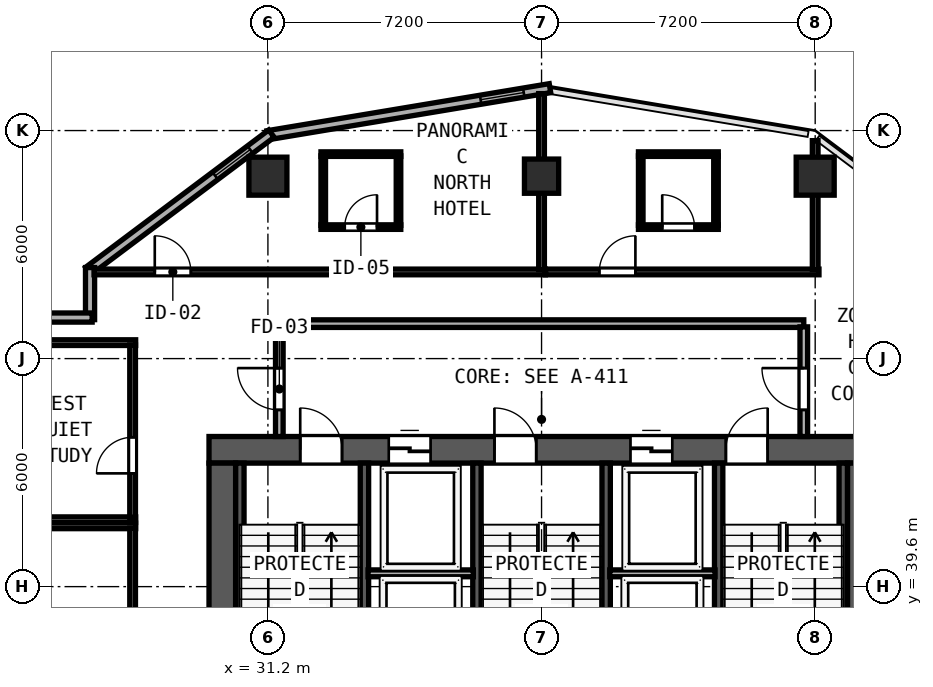
"""IFC4 building model, lengths in metres.
Left out: names, types, materials, properties, quantities, classifications, styles, units other than length and angle.
Written with IfcOpenShell. Run it as: python <this file> out.ifc"""

import sys

from ifc_helpers import new_model, si_unit, direction, frame, frame_2d, origin, origin_2d, place, context, subcontext, project, spatial, rectangle, hollow_rectangle, extrude, element, fill, save


model = new_model("IFC4")
c1 = context("Model", 3, precision=1e-05, world=origin(), true_north=direction((0.0, 1.0)))
c2 = subcontext(c1, "Body", "Model", "MODEL_VIEW")
j1 = project(units=[si_unit("LENGTHUNIT", "METRE"), si_unit("PLANEANGLEUNIT", "RADIAN")], contexts=[c1])
p1 = place(None, origin())
s1 = spatial("IfcSite", under=j1, at=p1, CompositionType="ELEMENT")
p2 = place(p1, origin())
s2 = spatial("IfcBuilding", under=s1, at=p2, CompositionType="ELEMENT")
p3 = place(p2, frame((0.0, 0.0, 144.8)))
s3 = spatial("IfcBuildingStorey", under=s2, at=p3, CompositionType="ELEMENT", Elevation=144.8)
p4 = place(p3, frame((29.65, 43.2, 0.0), z_axis=(0.0, 0.0, 1.0), x_axis=(1.0, 0.0, 0.0)))
e1 = element("IfcWall", 1, at=p4, inside=s3, PredefinedType="SHEAR", context=c2, shape_type="SweptSolid", body=[
    extrude(rectangle(XDim=17.5, YDim=0.7, at=frame_2d((8.75, 0.0))), origin(), (0.0, 0.0, 1.0), 3.6),
])
p5 = place(p4, frame((2.4, 0.0, 0.0)))
e2 = element("IfcOpeningElement", 2, at=p5, cuts=e1, PredefinedType="OPENING", context=c2, shape_type="SweptSolid", body=[
    extrude(rectangle(XDim=1.1, YDim=2.15, at=frame_2d((0.55, 1.075))), frame((0.0, 0.36, 0.0), z_axis=(0.0, -1.0, 0.0), x_axis=(1.0, 0.0, 0.0)), (0.0, 0.0, 1.0), 0.72),
])
p6 = place(p4, frame((7.51, 0.0, 0.0)))
e3 = element("IfcOpeningElement", 3, at=p6, cuts=e1, PredefinedType="OPENING", context=c2, shape_type="SweptSolid", body=[
    extrude(rectangle(XDim=1.1, YDim=2.15, at=frame_2d((0.55, 1.075))), frame((0.0, 0.36, 0.0), z_axis=(0.0, -1.0, 0.0), x_axis=(1.0, 0.0, 0.0)), (0.0, 0.0, 1.0), 0.72),
])
p7 = place(p4, frame((13.6, 0.0, 0.0)))
e4 = element("IfcOpeningElement", 4, at=p7, cuts=e1, PredefinedType="OPENING", context=c2, shape_type="SweptSolid", body=[
    extrude(rectangle(XDim=1.1, YDim=2.15, at=frame_2d((0.55, 1.075))), frame((0.0, 0.36, 0.0), z_axis=(0.0, -1.0, 0.0), x_axis=(1.0, 0.0, 0.0)), (0.0, 0.0, 1.0), 0.72),
])
p8 = place(p4, frame((4.73, 0.0, 0.0)))
e5 = element("IfcOpeningElement", 5, at=p8, cuts=e1, PredefinedType="OPENING", context=c2, shape_type="SweptSolid", body=[
    extrude(rectangle(XDim=1.1, YDim=2.2, at=frame_2d((0.55, 1.1))), frame((0.0, 0.36, 0.0), z_axis=(0.0, -1.0, 0.0), x_axis=(1.0, 0.0, 0.0)), (0.0, 0.0, 1.0), 0.72),
])
p9 = place(p4, frame((11.09, 0.0, 0.0)))
e6 = element("IfcOpeningElement", 6, at=p9, cuts=e1, PredefinedType="OPENING", context=c2, shape_type="SweptSolid", body=[
    extrude(rectangle(XDim=1.1, YDim=2.2, at=frame_2d((0.55, 1.1))), frame((0.0, 0.36, 0.0), z_axis=(0.0, -1.0, 0.0), x_axis=(1.0, 0.0, 0.0)), (0.0, 0.0, 1.0), 0.72),
])
for number, where, z_axis, x_axis in (
    (7, (30.0, 32.8, 0.0), (0.0, 0.0, 1.0), (0.0, 1.0, 0.0)),
    (8, (46.8, 32.8, 0.0), (0.0, 0.0, 1.0), (0.0, 1.0, 0.0)),
):
    element("IfcWall", number, at=place(p3, frame(where, z_axis=z_axis, x_axis=x_axis)), inside=s3, PredefinedType="SHEAR", context=c2, shape_type="SweptSolid", body=[
        extrude(rectangle(XDim=10.05, YDim=0.7, at=frame_2d((5.025, 0.0))), origin(), (0.0, 0.0, 1.0), 3.6),
    ])
for number, where, z_axis, x_axis in (
    (9, (30.462, 35.39, 0.0), (0.0, 0.0, 1.0), (0.0, 1.0, 0.0)),
    (10, (33.74, 35.39, 0.0), (0.0, 0.0, 1.0), (0.0, 1.0, 0.0)),
    (11, (36.7, 35.39, 0.0), (0.0, 0.0, 1.0), (0.0, 1.0, 0.0)),
    (12, (40.1, 35.39, 0.0), (0.0, 0.0, 1.0), (0.0, 1.0, 0.0)),
    (13, (43.06, 35.39, 0.0), (0.0, 0.0, 1.0), (0.0, 1.0, 0.0)),
    (14, (46.338, 35.39, 0.0), (0.0, 0.0, 1.0), (0.0, 1.0, 0.0)),
):
    element("IfcWall", number, at=place(p3, frame(where, z_axis=z_axis, x_axis=x_axis)), inside=s3, PredefinedType="SHEAR", context=c2, shape_type="SweptSolid", body=[
        extrude(rectangle(XDim=7.46, YDim=0.22, at=frame_2d((3.73, 0.0))), origin(), (0.0, 0.0, 1.0), 3.6),
    ])
for number, where, z_axis, x_axis in (
    (15, (31.2, 50.4, 0.0), (0.0, 0.0, 1.0), (1.0, 0.0, 0.0)),
    (16, (45.6, 50.4, 0.0), (0.0, 0.0, 1.0), (1.0, 0.0, 0.0)),
):
    element("IfcColumn", number, at=place(p3, frame(where, z_axis=z_axis, x_axis=x_axis)), inside=s3, PredefinedType="COLUMN", context=c2, shape_type="SweptSolid", body=[
        extrude(hollow_rectangle(XDim=1.0, YDim=1.0, WallThickness=0.038, at=origin_2d()), origin(), (0.0, 0.0, 1.0), 3.8),
    ])
p10 = place(p3, frame((38.4, 50.4, 0.0), z_axis=(0.0, 0.0, 1.0), x_axis=(1.0, 0.0, 0.0)))
e17 = element("IfcColumn", 17, at=p10, inside=s3, PredefinedType="COLUMN", context=c2, shape_type="SweptSolid", body=[
    extrude(hollow_rectangle(XDim=0.9, YDim=0.9, WallThickness=0.034, at=origin_2d()), origin(), (0.0, 0.0, 1.0), 3.8),
])
p11 = place(p3, frame((38.622, 52.715, 0.0), z_axis=(0.0, 0.0, 1.0), x_axis=(-0.98639129485, -0.164414760418, 0.0)))
e18 = element("IfcWall", 18, at=p11, inside=s3, PredefinedType="SOLIDWALL", context=c2, shape_type="SweptSolid", body=[
    extrude(rectangle(XDim=7.53, YDim=0.24, at=frame_2d((3.765, 0.0))), origin(), (0.0, 0.0, 1.0), 3.6),
])
p12 = place(p11, frame((0.7, 0.0, 0.85)))
e19 = element("IfcOpeningElement", 19, at=p12, cuts=e18, PredefinedType="OPENING", context=c2, shape_type="SweptSolid", body=[
    extrude(rectangle(XDim=1.15, YDim=1.8, at=frame_2d((0.575, 0.9))), frame((0.0, 0.13, 0.0), z_axis=(0.0, -1.0, 0.0), x_axis=(1.0, 0.0, 0.0)), (0.0, 0.0, 1.0), 0.26),
])
p13 = place(p3, frame((31.292, 51.519, 0.0), z_axis=(0.0, 0.0, 1.0), x_axis=(-0.8, -0.6, 0.0)))
e20 = element("IfcWall", 20, at=p13, inside=s3, PredefinedType="SOLIDWALL", context=c2, shape_type="SweptSolid", body=[
    extrude(rectangle(XDim=6.021, YDim=0.24, at=frame_2d((3.01, 0.0))), origin(), (0.0, 0.0, 1.0), 3.6),
])
p14 = place(p13, frame((0.7, 0.0, 0.85)))
e21 = element("IfcOpeningElement", 21, at=p14, cuts=e20, PredefinedType="OPENING", context=c2, shape_type="SweptSolid", body=[
    extrude(rectangle(XDim=1.15, YDim=1.8, at=frame_2d((0.575, 0.9))), frame((0.0, 0.13, 0.0), z_axis=(0.0, -1.0, 0.0), x_axis=(1.0, 0.0, 0.0)), (0.0, 0.0, 1.0), 0.26),
])
p15 = place(p3, frame((26.52, 47.995, 0.0), z_axis=(0.0, 0.0, 1.0), x_axis=(0.0, -1.0, 0.0)))
e22 = element("IfcWall", 22, at=p15, inside=s3, PredefinedType="SOLIDWALL", context=c2, shape_type="SweptSolid", body=[
    extrude(rectangle(XDim=1.37, YDim=0.24, at=frame_2d((0.685, 0.0))), origin(), (0.0, 0.0, 1.0), 3.6),
])
p16 = place(p3, frame((26.575, 46.68, 0.0), z_axis=(0.0, 0.0, 1.0), x_axis=(-1.0, 0.0, 0.0)))
e23 = element("IfcWall", 23, at=p16, inside=s3, PredefinedType="SOLIDWALL", context=c2, shape_type="SweptSolid", body=[
    extrude(rectangle(XDim=1.31, YDim=0.24, at=frame_2d((0.655, 0.0))), origin(), (0.0, 0.0, 1.0), 3.6),
])
p17 = place(p3, frame((31.5, 46.52, 0.0), z_axis=(0.0, 0.0, 1.0), x_axis=(1.0, 0.0, 0.0)))
e24 = element("IfcWall", 24, at=p17, inside=s3, PredefinedType="SOLIDWALL", context=c2, shape_type="SweptSolid", body=[
    extrude(rectangle(XDim=13.8, YDim=0.2, at=frame_2d((6.9, 0.0))), origin(), (0.0, 0.0, 1.0), 3.6),
])
p18 = place(p3, frame((31.5, 43.55, 0.0), z_axis=(0.0, 0.0, 1.0), x_axis=(0.0, 1.0, 0.0)))
e25 = element("IfcWall", 25, at=p18, inside=s3, PredefinedType="SOLIDWALL", context=c2, shape_type="SweptSolid", body=[
    extrude(rectangle(XDim=2.885, YDim=0.2, at=frame_2d((1.442, 0.0))), origin(), (0.0, 0.0, 1.0), 3.6),
])
p19 = place(p18, frame((1.8, 0.0, 0.0), z_axis=(0.0, 0.0, 1.0), x_axis=(-1.0, 0.0, 0.0)))
e26 = element("IfcOpeningElement", 26, at=p19, cuts=e25, PredefinedType="OPENING", context=c2, shape_type="SweptSolid", body=[
    extrude(rectangle(XDim=1.1, YDim=2.15, at=frame_2d((0.55, 1.075))), frame((0.0, 0.11, 0.0), z_axis=(0.0, -1.0, 0.0), x_axis=(1.0, 0.0, 0.0)), (0.0, 0.0, 1.0), 0.22),
])
p20 = place(p3, frame((45.3, 43.55, 0.0), z_axis=(0.0, 0.0, 1.0), x_axis=(0.0, 1.0, 0.0)))
e27 = element("IfcWall", 27, at=p20, inside=s3, PredefinedType="SOLIDWALL", context=c2, shape_type="SweptSolid", body=[
    extrude(rectangle(XDim=2.885, YDim=0.2, at=frame_2d((1.442, 0.0))), origin(), (0.0, 0.0, 1.0), 3.6),
])
p21 = place(p20, frame((0.7, 0.0, 0.0)))
e28 = element("IfcOpeningElement", 28, at=p21, cuts=e27, PredefinedType="OPENING", context=c2, shape_type="SweptSolid", body=[
    extrude(rectangle(XDim=1.1, YDim=2.15, at=frame_2d((0.55, 1.075))), frame((0.0, 0.11, 0.0), z_axis=(0.0, -1.0, 0.0), x_axis=(1.0, 0.0, 0.0)), (0.0, 0.0, 1.0), 0.22),
])
for number, where, z_axis, x_axis in (
    (29, (33.835, 39.95, 0.0), (0.0, 0.0, 1.0), (1.0, 0.0, 0.0)),
    (30, (40.195, 39.95, 0.0), (0.0, 0.0, 1.0), (1.0, 0.0, 0.0)),
):
    element("IfcWall", number, at=place(p3, frame(where, z_axis=z_axis, x_axis=x_axis)), inside=s3, PredefinedType="SOLIDWALL", context=c2, shape_type="SweptSolid", body=[
        extrude(rectangle(XDim=2.77, YDim=0.18, at=frame_2d((1.385, 0.0))), origin(), (0.0, 0.0, 1.0), 3.6),
    ])
p22 = place(p3, frame((23.92, 41.2, 0.0), z_axis=(0.0, 0.0, 1.0), x_axis=(1.0, 0.0, 0.0)))
e31 = element("IfcWall", 31, at=p22, inside=s3, PredefinedType="PARTITIONING", context=c2, shape_type="SweptSolid", body=[
    extrude(rectangle(XDim=3.8, YDim=0.15, at=frame_2d((1.9, 0.0))), origin(), (0.0, 0.0, 1.0), 3.6),
])
p23 = place(p3, frame((27.64, 33.06, 0.0), z_axis=(0.0, 0.0, 1.0), x_axis=(0.0, 1.0, 0.0)))
e32 = element("IfcWall", 32, at=p23, inside=s3, PredefinedType="PARTITIONING", context=c2, shape_type="SweptSolid", body=[
    extrude(rectangle(XDim=8.08, YDim=0.15, at=frame_2d((4.04, 0.0))), origin(), (0.0, 0.0, 1.0), 3.6),
])
p24 = place(p23, frame((3.61, 0.0, 0.0), z_axis=(0.0, 0.0, 1.0), x_axis=(-1.0, 0.0, 0.0)))
e33 = element("IfcOpeningElement", 33, at=p24, cuts=e32, PredefinedType="OPENING", context=c2, shape_type="SweptSolid", body=[
    extrude(rectangle(XDim=0.95, YDim=2.12, at=frame_2d((0.475, 1.06))), frame((0.0, 0.085, 0.0), z_axis=(0.0, -1.0, 0.0), x_axis=(1.0, 0.0, 0.0)), (0.0, 0.0, 1.0), 0.17),
])
p25 = place(p3, frame((25.425, 46.02, 0.0), z_axis=(0.0, 0.0, 1.0), x_axis=(1.0, 0.0, 0.0)))
e34 = element("IfcWall", 34, at=p25, inside=s3, PredefinedType="PARTITIONING", context=c2, shape_type="SweptSolid", body=[
    extrude(rectangle(XDim=2.295, YDim=0.15, at=frame_2d((1.147, 0.0))), origin(), (0.0, 0.0, 1.0), 3.6),
])
p26 = place(p3, frame((23.92, 41.36, 0.0), z_axis=(0.0, 0.0, 1.0), x_axis=(1.0, 0.0, 0.0)))
e35 = element("IfcWall", 35, at=p26, inside=s3, PredefinedType="PARTITIONING", context=c2, shape_type="SweptSolid", body=[
    extrude(rectangle(XDim=3.8, YDim=0.15, at=frame_2d((1.9, 0.0))), origin(), (0.0, 0.0, 1.0), 3.6),
])
p27 = place(p3, frame((27.64, 41.42, 0.0), z_axis=(0.0, 0.0, 1.0), x_axis=(0.0, 1.0, 0.0)))
e36 = element("IfcWall", 36, at=p27, inside=s3, PredefinedType="PARTITIONING", context=c2, shape_type="SweptSolid", body=[
    extrude(rectangle(XDim=4.54, YDim=0.15, at=frame_2d((2.27, 0.0))), origin(), (0.0, 0.0, 1.0), 3.6),
])
p28 = place(p27, frame((2.11, 0.0, 0.0), z_axis=(0.0, 0.0, 1.0), x_axis=(-1.0, 0.0, 0.0)))
e37 = element("IfcOpeningElement", 37, at=p28, cuts=e36, PredefinedType="OPENING", context=c2, shape_type="SweptSolid", body=[
    extrude(rectangle(XDim=0.95, YDim=2.12, at=frame_2d((0.475, 1.06))), frame((0.0, 0.085, 0.0), z_axis=(0.0, -1.0, 0.0), x_axis=(1.0, 0.0, 0.0)), (0.0, 0.0, 1.0), 0.17),
])
p29 = place(p3, frame((26.625, 47.88, 0.0), z_axis=(0.0, 0.0, 1.0), x_axis=(1.0, 0.0, 0.0)))
e38 = element("IfcWall", 38, at=p29, inside=s3, PredefinedType="PARTITIONING", context=c2, shape_type="SweptSolid", body=[
    extrude(rectangle(XDim=11.875, YDim=0.15, at=frame_2d((5.938, 0.0))), origin(), (0.0, 0.0, 1.0), 3.6),
])
p30 = place(p29, frame((1.598, 0.0, 0.0)))
e39 = element("IfcOpeningElement", 39, at=p30, cuts=e38, PredefinedType="OPENING", context=c2, shape_type="SweptSolid", body=[
    extrude(rectangle(XDim=0.95, YDim=2.15, at=frame_2d((0.475, 1.075))), frame((0.0, 0.085, 0.0), z_axis=(0.0, -1.0, 0.0), x_axis=(1.0, 0.0, 0.0)), (0.0, 0.0, 1.0), 0.17),
])
p31 = place(p3, frame((38.4, 47.94, 0.0), z_axis=(0.0, 0.0, 1.0), x_axis=(0.0, 1.0, 0.0)))
e40 = element("IfcWall", 40, at=p31, inside=s3, PredefinedType="PARTITIONING", context=c2, shape_type="SweptSolid", body=[
    extrude(rectangle(XDim=4.632, YDim=0.15, at=frame_2d((2.316, 0.0))), origin(), (0.0, 0.0, 1.0), 3.6),
])
p32 = place(p3, frame((32.596, 50.98, 0.0), z_axis=(0.0, 0.0, 1.0), x_axis=(1.0, 0.0, 0.0)))
e41 = element("IfcWall", 41, at=p32, inside=s3, PredefinedType="PARTITIONING", context=c2, shape_type="SweptSolid", body=[
    extrude(rectangle(XDim=2.1, YDim=0.12, at=frame_2d((1.05, 0.0))), origin(), (0.0, 0.0, 1.0), 3.6),
])
p33 = place(p3, frame((32.596, 49.06, 0.0), z_axis=(0.0, 0.0, 1.0), x_axis=(1.0, 0.0, 0.0)))
e42 = element("IfcWall", 42, at=p33, inside=s3, PredefinedType="PARTITIONING", context=c2, shape_type="SweptSolid", body=[
    extrude(rectangle(XDim=2.1, YDim=0.12, at=frame_2d((1.05, 0.0))), origin(), (0.0, 0.0, 1.0), 3.6),
])
p34 = place(p33, frame((0.625, 0.0, 0.0)))
e43 = element("IfcOpeningElement", 43, at=p34, cuts=e42, PredefinedType="OPENING", context=c2, shape_type="SweptSolid", body=[
    extrude(rectangle(XDim=0.85, YDim=2.1, at=frame_2d((0.425, 1.05))), frame((0.0, 0.07, 0.0), z_axis=(0.0, -1.0, 0.0), x_axis=(1.0, 0.0, 0.0)), (0.0, 0.0, 1.0), 0.14),
])
for number, where, z_axis, x_axis in (
    (44, (32.656, 49.105, 0.0), (0.0, 0.0, 1.0), (0.0, 1.0, 0.0)),
    (45, (34.636, 49.105, 0.0), (0.0, 0.0, 1.0), (0.0, 1.0, 0.0)),
):
    element("IfcWall", number, at=place(p3, frame(where, z_axis=z_axis, x_axis=x_axis)), inside=s3, PredefinedType="PARTITIONING", context=c2, shape_type="SweptSolid", body=[
        extrude(rectangle(XDim=1.83, YDim=0.12, at=frame_2d((0.915, 0.0))), origin(), (0.0, 0.0, 1.0), 3.6),
    ])
p35 = place(p3, frame((38.502, 47.88, 0.0), z_axis=(0.0, 0.0, 1.0), x_axis=(1.0, 0.0, 0.0)))
e46 = element("IfcWall", 46, at=p35, inside=s3, PredefinedType="PARTITIONING", context=c2, shape_type="SweptSolid", body=[
    extrude(rectangle(XDim=7.198, YDim=0.15, at=frame_2d((3.599, 0.0))), origin(), (0.0, 0.0, 1.0), 3.6),
])
p36 = place(p35, frame((1.417, 0.0, 0.0)))
e47 = element("IfcOpeningElement", 47, at=p36, cuts=e46, PredefinedType="OPENING", context=c2, shape_type="SweptSolid", body=[
    extrude(rectangle(XDim=0.95, YDim=2.15, at=frame_2d((0.475, 1.075))), frame((0.0, 0.085, 0.0), z_axis=(0.0, -1.0, 0.0), x_axis=(1.0, 0.0, 0.0)), (0.0, 0.0, 1.0), 0.17),
])
p37 = place(p3, frame((45.6, 47.94, 0.0), z_axis=(0.0, 0.0, 1.0), x_axis=(0.0, 1.0, 0.0)))
e48 = element("IfcWall", 48, at=p37, inside=s3, PredefinedType="PARTITIONING", context=c2, shape_type="SweptSolid", body=[
    extrude(rectangle(XDim=3.395, YDim=0.15, at=frame_2d((1.698, 0.0))), origin(), (0.0, 0.0, 1.0), 3.085),
])
p38 = place(p3, frame((40.95, 50.98, 0.0), z_axis=(0.0, 0.0, 1.0), x_axis=(1.0, 0.0, 0.0)))
e49 = element("IfcWall", 49, at=p38, inside=s3, PredefinedType="PARTITIONING", context=c2, shape_type="SweptSolid", body=[
    extrude(rectangle(XDim=2.1, YDim=0.12, at=frame_2d((1.05, 0.0))), origin(), (0.0, 0.0, 1.0), 3.6),
])
p39 = place(p3, frame((40.95, 49.06, 0.0), z_axis=(0.0, 0.0, 1.0), x_axis=(1.0, 0.0, 0.0)))
e50 = element("IfcWall", 50, at=p39, inside=s3, PredefinedType="PARTITIONING", context=c2, shape_type="SweptSolid", body=[
    extrude(rectangle(XDim=2.1, YDim=0.12, at=frame_2d((1.05, 0.0))), origin(), (0.0, 0.0, 1.0), 3.6),
])
p40 = place(p39, frame((0.625, 0.0, 0.0)))
e51 = element("IfcOpeningElement", 51, at=p40, cuts=e50, PredefinedType="OPENING", context=c2, shape_type="SweptSolid", body=[
    extrude(rectangle(XDim=0.85, YDim=2.1, at=frame_2d((0.425, 1.05))), frame((0.0, 0.07, 0.0), z_axis=(0.0, -1.0, 0.0), x_axis=(1.0, 0.0, 0.0)), (0.0, 0.0, 1.0), 0.14),
])
for number, where, z_axis, x_axis in (
    (52, (41.01, 49.105, 0.0), (0.0, 0.0, 1.0), (0.0, 1.0, 0.0)),
    (53, (42.99, 49.105, 0.0), (0.0, 0.0, 1.0), (0.0, 1.0, 0.0)),
):
    element("IfcWall", number, at=place(p3, frame(where, z_axis=z_axis, x_axis=x_axis)), inside=s3, PredefinedType="PARTITIONING", context=c2, shape_type="SweptSolid", body=[
        extrude(rectangle(XDim=1.83, YDim=0.12, at=frame_2d((0.915, 0.0))), origin(), (0.0, 0.0, 1.0), 3.6),
    ])
p41 = place(p12, origin())
e54 = element("IfcWindow", 54, at=p41, inside=s3, PartitioningType="SINGLE_PANEL", PredefinedType="WINDOW", context=c2, shape_type="SweptSolid", body=[
    extrude(rectangle(XDim=1.15, YDim=1.8, at=frame_2d((0.575, 0.9))), frame((0.0, 0.03, 0.0), z_axis=(0.0, -1.0, 0.0), x_axis=(1.0, 0.0, 0.0)), (0.0, 0.0, 1.0), 0.06),
])
fill(e19, e54)
p42 = place(p14, origin())
e55 = element("IfcWindow", 55, at=p42, inside=s3, PartitioningType="SINGLE_PANEL", PredefinedType="WINDOW", context=c2, shape_type="SweptSolid", body=[
    extrude(rectangle(XDim=1.15, YDim=1.8, at=frame_2d((0.575, 0.9))), frame((0.0, 0.03, 0.0), z_axis=(0.0, -1.0, 0.0), x_axis=(1.0, 0.0, 0.0)), (0.0, 0.0, 1.0), 0.06),
])
fill(e21, e55)
p43 = place(p5, origin())
e56 = element("IfcDoor", 56, at=p43, inside=s3, OperationType="SINGLE_SWING_LEFT", PredefinedType="DOOR", context=c2, shape_type="SweptSolid", body=[
    extrude(rectangle(XDim=1.1, YDim=2.15, at=frame_2d((0.55, 1.075))), frame((0.0, 0.185, 0.0), z_axis=(0.0, -1.0, 0.0), x_axis=(1.0, 0.0, 0.0)), (0.0, 0.0, 1.0), 0.05),
])
fill(e2, e56)
p44 = place(p6, origin())
e57 = element("IfcDoor", 57, at=p44, inside=s3, OperationType="SINGLE_SWING_LEFT", PredefinedType="DOOR", context=c2, shape_type="SweptSolid", body=[
    extrude(rectangle(XDim=1.1, YDim=2.15, at=frame_2d((0.55, 1.075))), frame((0.0, 0.185, 0.0), z_axis=(0.0, -1.0, 0.0), x_axis=(1.0, 0.0, 0.0)), (0.0, 0.0, 1.0), 0.05),
])
fill(e3, e57)
p45 = place(p7, origin())
e58 = element("IfcDoor", 58, at=p45, inside=s3, OperationType="SINGLE_SWING_RIGHT", PredefinedType="DOOR", context=c2, shape_type="SweptSolid", body=[
    extrude(rectangle(XDim=1.1, YDim=2.15, at=frame_2d((0.55, 1.075))), frame((0.0, 0.185, 0.0), z_axis=(0.0, -1.0, 0.0), x_axis=(1.0, 0.0, 0.0)), (0.0, 0.0, 1.0), 0.05),
])
fill(e4, e58)
p46 = place(p19, origin())
e59 = element("IfcDoor", 59, at=p46, inside=s3, OperationType="SINGLE_SWING_LEFT", PredefinedType="DOOR", context=c2, shape_type="SweptSolid", body=[
    extrude(rectangle(XDim=1.1, YDim=2.15, at=frame_2d((0.55, 1.075))), frame((0.0, 0.025, 0.0), z_axis=(0.0, -1.0, 0.0), x_axis=(1.0, 0.0, 0.0)), (0.0, 0.0, 1.0), 0.05),
])
fill(e26, e59)
p47 = place(p21, origin())
e60 = element("IfcDoor", 60, at=p47, inside=s3, OperationType="SINGLE_SWING_RIGHT", PredefinedType="DOOR", context=c2, shape_type="SweptSolid", body=[
    extrude(rectangle(XDim=1.1, YDim=2.15, at=frame_2d((0.55, 1.075))), frame((0.0, 0.025, 0.0), z_axis=(0.0, -1.0, 0.0), x_axis=(1.0, 0.0, 0.0)), (0.0, 0.0, 1.0), 0.05),
])
fill(e28, e60)
p48 = place(p8, origin())
e61 = element("IfcDoor", 61, at=p48, inside=s3, OperationType="SLIDING_TO_LEFT", PredefinedType="DOOR", context=c2, shape_type="SweptSolid", body=[
    extrude(rectangle(XDim=1.1, YDim=2.2, at=frame_2d((0.55, 1.1))), frame((0.0, 0.185, 0.0), z_axis=(0.0, -1.0, 0.0), x_axis=(1.0, 0.0, 0.0)), (0.0, 0.0, 1.0), 0.05),
])
fill(e5, e61)
p49 = place(p9, origin())
e62 = element("IfcDoor", 62, at=p49, inside=s3, OperationType="SLIDING_TO_LEFT", PredefinedType="DOOR", context=c2, shape_type="SweptSolid", body=[
    extrude(rectangle(XDim=1.1, YDim=2.2, at=frame_2d((0.55, 1.1))), frame((0.0, 0.185, 0.0), z_axis=(0.0, -1.0, 0.0), x_axis=(1.0, 0.0, 0.0)), (0.0, 0.0, 1.0), 0.05),
])
fill(e6, e62)
p50 = place(p28, origin())
e63 = element("IfcDoor", 63, at=p50, inside=s3, OperationType="SINGLE_SWING_RIGHT", PredefinedType="DOOR", context=c2, shape_type="SweptSolid", body=[
    extrude(rectangle(XDim=0.95, YDim=2.12, at=frame_2d((0.475, 1.06))), frame((0.0, 0.025, 0.0), z_axis=(0.0, -1.0, 0.0), x_axis=(1.0, 0.0, 0.0)), (0.0, 0.0, 1.0), 0.05),
])
fill(e37, e63)
p51 = place(p30, origin())
e64 = element("IfcDoor", 64, at=p51, inside=s3, OperationType="SINGLE_SWING_LEFT", PredefinedType="DOOR", context=c2, shape_type="SweptSolid", body=[
    extrude(rectangle(XDim=0.95, YDim=2.15, at=frame_2d((0.475, 1.075))), frame((0.0, 0.025, 0.0), z_axis=(0.0, -1.0, 0.0), x_axis=(1.0, 0.0, 0.0)), (0.0, 0.0, 1.0), 0.05),
])
fill(e39, e64)
p52 = place(p34, origin())
e65 = element("IfcDoor", 65, at=p52, inside=s3, OperationType="SINGLE_SWING_RIGHT", PredefinedType="DOOR", context=c2, shape_type="SweptSolid", body=[
    extrude(rectangle(XDim=0.85, YDim=2.1, at=frame_2d((0.425, 1.05))), frame((0.0, 0.025, 0.0), z_axis=(0.0, -1.0, 0.0), x_axis=(1.0, 0.0, 0.0)), (0.0, 0.0, 1.0), 0.05),
])
fill(e43, e65)
p53 = place(p36, origin())
e66 = element("IfcDoor", 66, at=p53, inside=s3, OperationType="SINGLE_SWING_RIGHT", PredefinedType="DOOR", context=c2, shape_type="SweptSolid", body=[
    extrude(rectangle(XDim=0.95, YDim=2.15, at=frame_2d((0.475, 1.075))), frame((0.0, 0.025, 0.0), z_axis=(0.0, -1.0, 0.0), x_axis=(1.0, 0.0, 0.0)), (0.0, 0.0, 1.0), 0.05),
])
fill(e47, e66)
p54 = place(p40, origin())
e67 = element("IfcDoor", 67, at=p54, inside=s3, OperationType="SINGLE_SWING_LEFT", PredefinedType="DOOR", context=c2, shape_type="SweptSolid", body=[
    extrude(rectangle(XDim=0.85, YDim=2.1, at=frame_2d((0.425, 1.05))), frame((0.0, 0.025, 0.0), z_axis=(0.0, -1.0, 0.0), x_axis=(1.0, 0.0, 0.0)), (0.0, 0.0, 1.0), 0.05),
])
fill(e51, e67)
save(model, sys.argv[1])
